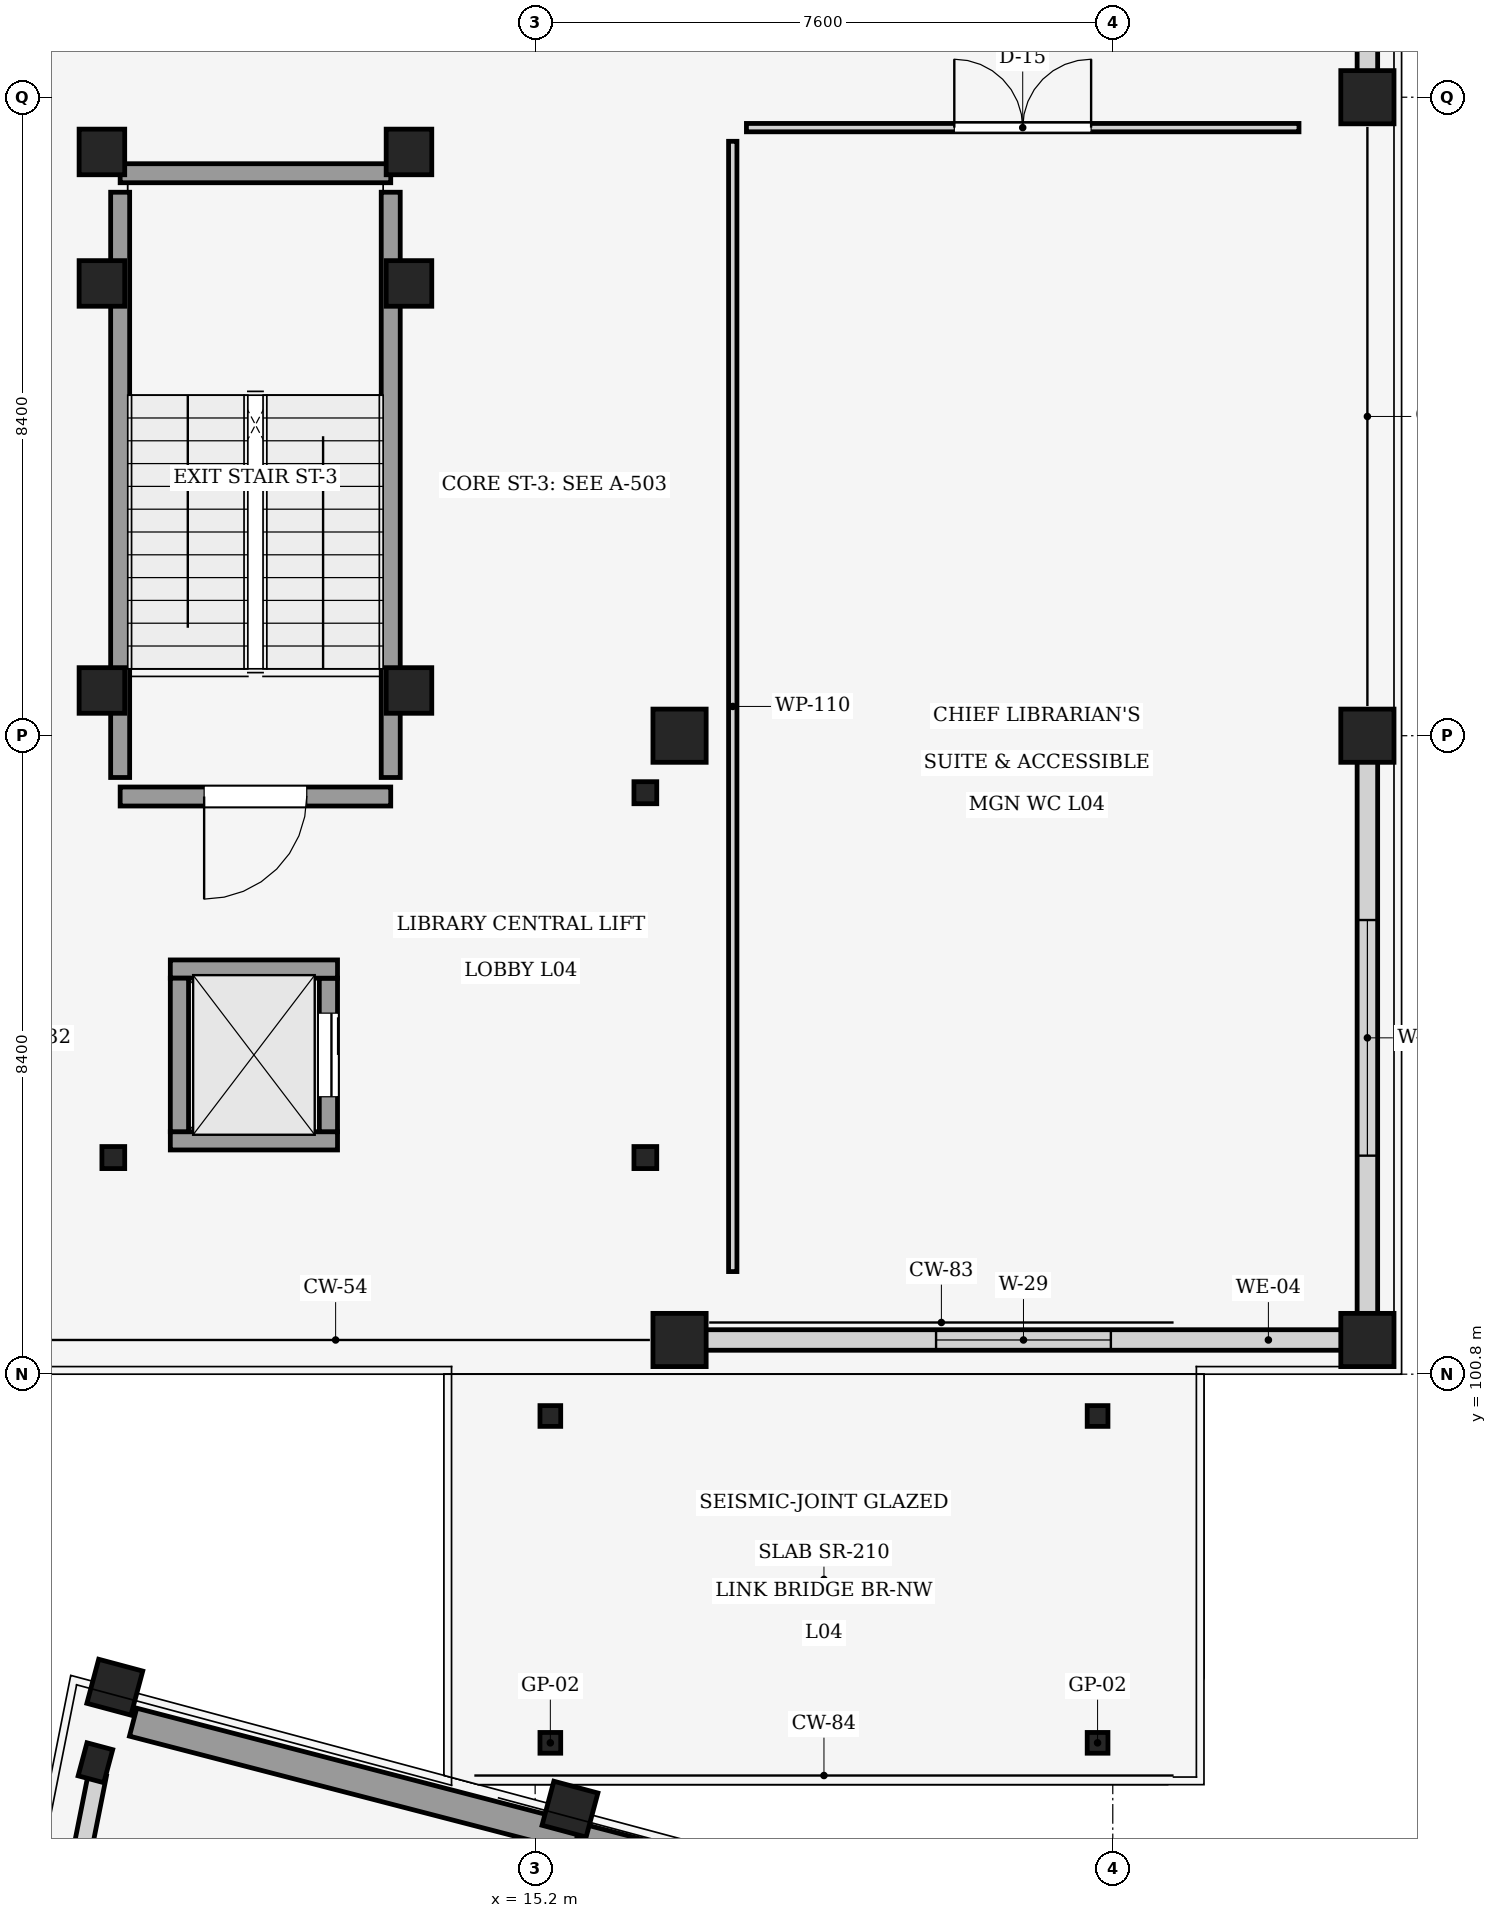
"""IFC4 building model, lengths in metres.
Left out: names, types, materials, properties, quantities, classifications, styles, units other than length and angle.
Written with IfcOpenShell. Run it as: python <this file> out.ifc"""

import sys

from ifc_helpers import new_model, si_unit, direction, frame, frame_2d, origin, origin_2d, place, context, subcontext, project, spatial, rectangle, hollow_circle, i_section, extrude, element, fill, save


model = new_model("IFC4")
c1 = context("Model", 3, precision=1e-05, world=origin(), true_north=direction((0.0, 1.0)))
c2 = subcontext(c1, "Body", "Model", "MODEL_VIEW")
j1 = project(units=[si_unit("LENGTHUNIT", "METRE"), si_unit("PLANEANGLEUNIT", "RADIAN")], contexts=[c1])
p1 = place(None, origin())
s1 = spatial("IfcSite", under=j1, at=p1, CompositionType="ELEMENT")
p2 = place(p1, origin())
s2 = spatial("IfcBuilding", under=s1, at=p2, CompositionType="ELEMENT")
p3 = place(p2, frame((0.0, 0.0, 17.25)))
s3 = spatial("IfcBuildingStorey", under=s2, at=p3, CompositionType="ELEMENT", Elevation=17.25)
for number, where, z_axis, x_axis in (
    (1, (15.658, 95.077, 0.0), (0.0, 0.0, 1.0), (-0.966, 0.259, 0.0)),
    (2, (9.67, 96.682, 0.0), (0.0, 0.0, 1.0), (-0.966, 0.259, 0.0)),
):
    element("IfcColumn", number, at=place(p3, frame(where, z_axis=z_axis, x_axis=x_axis)), inside=s3, PredefinedType="COLUMN", context=c2, shape_type="SweptSolid", body=[
        extrude(rectangle(XDim=0.6, YDim=0.6, at=origin_2d()), origin(), (0.0, 0.0, 1.0), 4.05),
    ])
p4 = place(p3, frame((9.414, 95.688, 0.0), z_axis=(0.0, 0.0, 1.0), x_axis=(-0.965925826289, 0.258819045103, 0.0)))
e3 = element("IfcColumn", 3, at=p4, inside=s3, PredefinedType="PILASTER", context=c2, shape_type="SweptSolid", body=[
    extrude(rectangle(XDim=0.35, YDim=0.45, at=origin_2d()), origin(), (0.0, 0.0, 1.0), 4.05),
])
for number, where, z_axis, x_axis in (
    (4, (17.1, 101.25, 0.0), (0.0, 0.0, 1.0), (1.0, 0.0, 0.0)),
    (5, (17.1, 109.2, 0.0), (0.0, 0.0, 1.0), (1.0, 0.0, 0.0)),
    (6, (26.15, 101.25, 0.0), (0.0, 0.0, 1.0), (1.0, 0.0, 0.0)),
    (7, (26.15, 109.2, 0.0), (0.0, 0.0, 1.0), (1.0, 0.0, 0.0)),
    (8, (26.15, 117.6, 0.0), (0.0, 0.0, 1.0), (1.0, 0.0, 0.0)),
):
    element("IfcColumn", number, at=place(p3, frame(where, z_axis=z_axis, x_axis=x_axis)), inside=s3, PredefinedType="COLUMN", context=c2, shape_type="SweptSolid", body=[
        extrude(rectangle(XDim=0.7, YDim=0.7, at=origin_2d()), origin(), (0.0, 0.0, 1.0), 4.05),
    ])
for number, where, z_axis, x_axis in (
    (9, (15.4, 95.95, 0.0), (0.0, 0.0, 1.0), (1.0, 0.0, 0.0)),
    (10, (22.6, 95.95, 0.0), (0.0, 0.0, 1.0), (1.0, 0.0, 0.0)),
    (11, (22.6, 100.25, 0.0), (0.0, 0.0, 1.0), (1.0, 0.0, 0.0)),
    (12, (15.4, 100.25, 0.0), (0.0, 0.0, 1.0), (1.0, 0.0, 0.0)),
):
    element("IfcColumn", number, at=place(p3, frame(where, z_axis=z_axis, x_axis=x_axis)), inside=s3, PredefinedType="COLUMN", context=c2, shape_type="SweptSolid", body=[
        extrude(hollow_circle(Radius=0.136, WallThickness=0.016, at=origin_2d()), origin(), (0.0, 0.0, 1.0), 3.1),
    ])
for number, where, z_axis, x_axis in (
    (13, (13.54, 109.795, 0.0), (0.0, 0.0, 1.0), (1.0, 0.0, 0.0)),
    (14, (9.5, 109.795, 0.0), (0.0, 0.0, 1.0), (1.0, 0.0, 0.0)),
    (15, (13.54, 115.15, 0.0), (0.0, 0.0, 1.0), (1.0, 0.0, 0.0)),
    (16, (9.5, 115.15, 0.0), (0.0, 0.0, 1.0), (1.0, 0.0, 0.0)),
    (17, (13.54, 116.88, 0.0), (0.0, 0.0, 1.0), (1.0, 0.0, 0.0)),
    (18, (9.5, 116.88, 0.0), (0.0, 0.0, 1.0), (1.0, 0.0, 0.0)),
):
    element("IfcColumn", number, at=place(p3, frame(where, z_axis=z_axis, x_axis=x_axis)), inside=s3, PredefinedType="COLUMN", context=c2, shape_type="SweptSolid", body=[
        extrude(rectangle(XDim=0.6, YDim=0.6, at=origin_2d()), origin(), (0.0, 0.0, 1.0), 4.05),
    ])
for number, where, z_axis, x_axis in (
    (19, (9.65, 103.65, 0.0), (0.0, 0.0, 1.0), (1.0, 0.0, 0.0)),
    (20, (16.65, 103.65, 0.0), (0.0, 0.0, 1.0), (1.0, 0.0, 0.0)),
    (21, (16.65, 108.45, 0.0), (0.0, 0.0, 1.0), (1.0, 0.0, 0.0)),
):
    element("IfcColumn", number, at=place(p3, frame(where, z_axis=z_axis, x_axis=x_axis)), inside=s3, PredefinedType="COLUMN", context=c2, shape_type="SweptSolid", body=[
        extrude(i_section(OverallWidth=0.3, OverallDepth=0.29, WebThickness=0.009, FlangeThickness=0.014, at=origin_2d()), origin(), (0.0, 0.0, 1.0), 4.05),
    ])
p5 = place(p3, frame((8.466, 90.631, 0.0), z_axis=(0.0, 0.0, 1.0), x_axis=(0.195083817114, 0.980786574286, 0.0)))
e22 = element("IfcWall", 22, at=p5, inside=s3, PredefinedType="STANDARD", context=c2, shape_type="SweptSolid", body=[
    extrude(rectangle(XDim=5.003, YDim=0.24, at=frame_2d((2.502, 0.0))), origin(), (0.0, 0.0, 1.0), 3.135),
])
p6 = place(p5, frame((1.902, 0.0, 0.85)))
e23 = element("IfcOpeningElement", 23, at=p6, cuts=e22, PredefinedType="OPENING", context=c2, shape_type="SweptSolid", body=[
    extrude(rectangle(XDim=1.2, YDim=1.65, at=frame_2d((0.6, 0.825))), frame((0.0, 0.13, 0.0), z_axis=(0.0, -1.0, 0.0), x_axis=(1.0, 0.0, 0.0)), (0.0, 0.0, 1.0), 0.26),
])
p7 = place(p3, frame((9.91, 96.222, 0.0), z_axis=(0.0, 0.0, 1.0), x_axis=(0.96792914822, -0.251223334956, 0.0)))
e24 = element("IfcWall", 24, at=p7, inside=s3, PredefinedType="SHEAR", context=c2, shape_type="SweptSolid", body=[
    extrude(rectangle(XDim=12.1, YDim=0.38, at=frame_2d((6.05, 0.0))), origin(), (0.0, 0.0, 1.0), 3.75),
])
p8 = place(p3, frame((25.865, 101.25, 0.0), z_axis=(0.0, 0.0, 1.0), x_axis=(-1.0, 0.0, 0.0)))
e25 = element("IfcWall", 25, at=p8, inside=s3, PredefinedType="STANDARD", context=c2, shape_type="SweptSolid", body=[
    extrude(rectangle(XDim=8.48, YDim=0.27, at=frame_2d((4.24, 0.0))), origin(), (0.0, 0.0, 1.0), 3.7),
])
p9 = place(p8, frame((3.09, 0.0, 0.85)))
e26 = element("IfcOpeningElement", 26, at=p9, cuts=e25, PredefinedType="OPENING", context=c2, shape_type="SweptSolid", body=[
    extrude(rectangle(XDim=2.3, YDim=1.85, at=frame_2d((1.15, 0.925))), frame((0.0, 0.145, 0.0), z_axis=(0.0, -1.0, 0.0), x_axis=(1.0, 0.0, 0.0)), (0.0, 0.0, 1.0), 0.29),
])
p10 = place(p3, frame((26.15, 126.845, 0.0), z_axis=(0.0, 0.0, 1.0), x_axis=(0.0, -1.0, 0.0)))
e27 = element("IfcWall", 27, at=p10, inside=s3, PredefinedType="STANDARD", context=c2, shape_type="SweptSolid", body=[
    extrude(rectangle(XDim=8.96, YDim=0.27, at=frame_2d((4.48, 0.0))), origin(), (0.0, 0.0, 1.0), 3.7),
])
p11 = place(p10, frame((3.28, 0.0, 0.85)))
e28 = element("IfcOpeningElement", 28, at=p11, cuts=e27, PredefinedType="OPENING", context=c2, shape_type="SweptSolid", body=[
    extrude(rectangle(XDim=2.4, YDim=2.05, at=frame_2d((1.2, 1.025))), frame((0.0, 0.145, 0.0), z_axis=(0.0, -1.0, 0.0), x_axis=(1.0, 0.0, 0.0)), (0.0, 0.0, 1.0), 0.29),
])
p12 = place(p3, frame((26.15, 108.915, 0.0), z_axis=(0.0, 0.0, 1.0), x_axis=(0.0, -1.0, 0.0)))
e29 = element("IfcWall", 29, at=p12, inside=s3, PredefinedType="STANDARD", context=c2, shape_type="SweptSolid", body=[
    extrude(rectangle(XDim=7.38, YDim=0.27, at=frame_2d((3.69, 0.0))), origin(), (0.0, 0.0, 1.0), 3.7),
])
p13 = place(p12, frame((2.14, 0.0, 0.85)))
e30 = element("IfcOpeningElement", 30, at=p13, cuts=e29, PredefinedType="OPENING", context=c2, shape_type="SweptSolid", body=[
    extrude(rectangle(XDim=3.1, YDim=2.05, at=frame_2d((1.55, 1.025))), frame((0.0, 0.145, 0.0), z_axis=(0.0, -1.0, 0.0), x_axis=(1.0, 0.0, 0.0)), (0.0, 0.0, 1.0), 0.29),
])
p14 = place(p3, frame((13.3, 108.4, 0.0), z_axis=(0.0, 0.0, 1.0), x_axis=(-1.0, 0.0, 0.0)))
e31 = element("IfcWall", 31, at=p14, inside=s3, PredefinedType="SHEAR", context=c2, shape_type="SweptSolid", body=[
    extrude(rectangle(XDim=3.56, YDim=0.25, at=frame_2d((1.78, 0.0))), origin(), (0.0, 0.0, 1.0), 4.05),
])
p15 = place(p14, frame((1.105, 0.0, 0.0)))
e32 = element("IfcOpeningElement", 32, at=p15, cuts=e31, PredefinedType="OPENING", context=c2, shape_type="SweptSolid", body=[
    extrude(rectangle(XDim=1.35, YDim=2.2, at=frame_2d((0.675, 1.1))), frame((0.0, 0.135, 0.0), z_axis=(0.0, -1.0, 0.0), x_axis=(1.0, 0.0, 0.0)), (0.0, 0.0, 1.0), 0.27),
])
p16 = place(p3, frame((9.74, 108.65, 0.0), z_axis=(0.0, 0.0, 1.0), x_axis=(0.0, 1.0, 0.0)))
e33 = element("IfcWall", 33, at=p16, inside=s3, PredefinedType="SHEAR", context=c2, shape_type="SweptSolid", body=[
    extrude(rectangle(XDim=7.7, YDim=0.25, at=frame_2d((3.85, 0.0))), origin(), (0.0, 0.0, 1.0), 4.05),
])
p17 = place(p3, frame((9.74, 116.6, 0.0), z_axis=(0.0, 0.0, 1.0), x_axis=(1.0, 0.0, 0.0)))
e34 = element("IfcWall", 34, at=p17, inside=s3, PredefinedType="SHEAR", context=c2, shape_type="SweptSolid", body=[
    extrude(rectangle(XDim=3.56, YDim=0.25, at=frame_2d((1.78, 0.0))), origin(), (0.0, 0.0, 1.0), 4.05),
])
p18 = place(p3, frame((13.3, 116.35, 0.0), z_axis=(0.0, 0.0, 1.0), x_axis=(0.0, -1.0, 0.0)))
e35 = element("IfcWall", 35, at=p18, inside=s3, PredefinedType="SHEAR", context=c2, shape_type="SweptSolid", body=[
    extrude(rectangle(XDim=7.7, YDim=0.25, at=frame_2d((3.85, 0.0))), origin(), (0.0, 0.0, 1.0), 4.05),
])
p19 = place(p3, frame((12.6, 103.87, 0.0), z_axis=(0.0, 0.0, 1.0), x_axis=(-1.0, 0.0, 0.0)))
e36 = element("IfcWall", 36, at=p19, inside=s3, PredefinedType="SHEAR", context=c2, shape_type="SweptSolid", body=[
    extrude(rectangle(XDim=2.2, YDim=0.24, at=frame_2d((1.1, 0.0))), origin(), (0.0, 0.0, 1.0), 4.05),
])
p20 = place(p3, frame((12.48, 106.01, 0.0), z_axis=(0.0, 0.0, 1.0), x_axis=(0.0, -1.0, 0.0)))
e37 = element("IfcWall", 37, at=p20, inside=s3, PredefinedType="SHEAR", context=c2, shape_type="SweptSolid", body=[
    extrude(rectangle(XDim=2.02, YDim=0.24, at=frame_2d((1.01, 0.0))), origin(), (0.0, 0.0, 1.0), 4.05),
])
p21 = place(p20, frame((0.46, 0.0, 0.0)))
e38 = element("IfcOpeningElement", 38, at=p21, cuts=e37, PredefinedType="OPENING", context=c2, shape_type="SweptSolid", body=[
    extrude(rectangle(XDim=1.1, YDim=2.15, at=frame_2d((0.55, 1.075))), frame((0.0, 0.13, 0.0), z_axis=(0.0, -1.0, 0.0), x_axis=(1.0, 0.0, 0.0)), (0.0, 0.0, 1.0), 0.26),
])
p22 = place(p3, frame((10.4, 106.13, 0.0), z_axis=(0.0, 0.0, 1.0), x_axis=(1.0, 0.0, 0.0)))
e39 = element("IfcWall", 39, at=p22, inside=s3, PredefinedType="SHEAR", context=c2, shape_type="SweptSolid", body=[
    extrude(rectangle(XDim=2.2, YDim=0.24, at=frame_2d((1.1, 0.0))), origin(), (0.0, 0.0, 1.0), 4.05),
])
p23 = place(p3, frame((10.52, 103.99, 0.0), z_axis=(0.0, 0.0, 1.0), x_axis=(0.0, 1.0, 0.0)))
e40 = element("IfcWall", 40, at=p23, inside=s3, PredefinedType="SHEAR", context=c2, shape_type="SweptSolid", body=[
    extrude(rectangle(XDim=2.02, YDim=0.24, at=frame_2d((1.01, 0.0))), origin(), (0.0, 0.0, 1.0), 4.05),
])
p24 = place(p3, frame((17.8, 102.15, 0.0), z_axis=(0.0, 0.0, 1.0), x_axis=(0.0, 1.0, 0.0)))
e41 = element("IfcWall", 41, at=p24, inside=s3, PredefinedType="PARTITIONING", context=c2, shape_type="SweptSolid", body=[
    extrude(rectangle(XDim=14.87, YDim=0.11, at=frame_2d((7.435, 0.0))), origin(), (0.0, 0.0, 1.0), 3.63),
])
p25 = place(p3, frame((17.98, 117.2, 0.0), z_axis=(0.0, 0.0, 1.0), x_axis=(1.0, 0.0, 0.0)))
e42 = element("IfcWall", 42, at=p25, inside=s3, PredefinedType="PARTITIONING", context=c2, shape_type="SweptSolid", body=[
    extrude(rectangle(XDim=7.27, YDim=0.11, at=frame_2d((3.635, 0.0))), origin(), (0.0, 0.0, 1.0), 3.105),
])
p26 = place(p25, frame((2.735, 0.0, 0.0)))
e43 = element("IfcOpeningElement", 43, at=p26, cuts=e42, PredefinedType="OPENING", context=c2, shape_type="SweptSolid", body=[
    extrude(rectangle(XDim=1.8, YDim=2.22, at=frame_2d((0.9, 1.11))), frame((0.0, 0.065, 0.0), z_axis=(0.0, -1.0, 0.0), x_axis=(1.0, 0.0, 0.0)), (0.0, 0.0, 1.0), 0.13),
])
p27 = place(p9, origin())
e44 = element("IfcWindow", 44, at=p27, inside=s3, PartitioningType="SINGLE_PANEL", PredefinedType="WINDOW", context=c2, shape_type="SweptSolid", body=[
    extrude(rectangle(XDim=2.3, YDim=1.85, at=frame_2d((1.15, 0.925))), frame((0.0, 0.03, 0.0), z_axis=(0.0, -1.0, 0.0), x_axis=(1.0, 0.0, 0.0)), (0.0, 0.0, 1.0), 0.06),
])
fill(e26, e44)
p28 = place(p13, origin())
e45 = element("IfcWindow", 45, at=p28, inside=s3, PartitioningType="SINGLE_PANEL", PredefinedType="WINDOW", context=c2, shape_type="SweptSolid", body=[
    extrude(rectangle(XDim=3.1, YDim=2.05, at=frame_2d((1.55, 1.025))), frame((0.0, 0.03, 0.0), z_axis=(0.0, -1.0, 0.0), x_axis=(1.0, 0.0, 0.0)), (0.0, 0.0, 1.0), 0.06),
])
fill(e30, e45)
p29 = place(p15, origin())
e46 = element("IfcDoor", 46, at=p29, inside=s3, OperationType="SINGLE_SWING_RIGHT", PredefinedType="DOOR", context=c2, shape_type="SweptSolid", body=[
    extrude(rectangle(XDim=1.35, YDim=2.2, at=frame_2d((0.675, 1.1))), frame((0.0, 0.025, 0.0), z_axis=(0.0, -1.0, 0.0), x_axis=(1.0, 0.0, 0.0)), (0.0, 0.0, 1.0), 0.05),
])
fill(e32, e46)
p30 = place(p21, origin())
e47 = element("IfcDoor", 47, at=p30, inside=s3, OperationType="SLIDING_TO_LEFT", PredefinedType="DOOR", context=c2, shape_type="SweptSolid", body=[
    extrude(rectangle(XDim=1.1, YDim=2.15, at=frame_2d((0.55, 1.075))), frame((0.0, 0.025, 0.0), z_axis=(0.0, -1.0, 0.0), x_axis=(1.0, 0.0, 0.0)), (0.0, 0.0, 1.0), 0.05),
])
fill(e38, e47)
p31 = place(p26, origin())
e48 = element("IfcDoor", 48, at=p31, inside=s3, OperationType="DOUBLE_DOOR_SINGLE_SWING", PredefinedType="DOOR", context=c2, shape_type="SweptSolid", body=[
    extrude(rectangle(XDim=1.8, YDim=2.22, at=frame_2d((0.9, 1.11))), frame((0.0, 0.025, 0.0), z_axis=(0.0, -1.0, 0.0), x_axis=(1.0, 0.0, 0.0)), (0.0, 0.0, 1.0), 0.05),
])
fill(e43, e48)
save(model, sys.argv[1])
